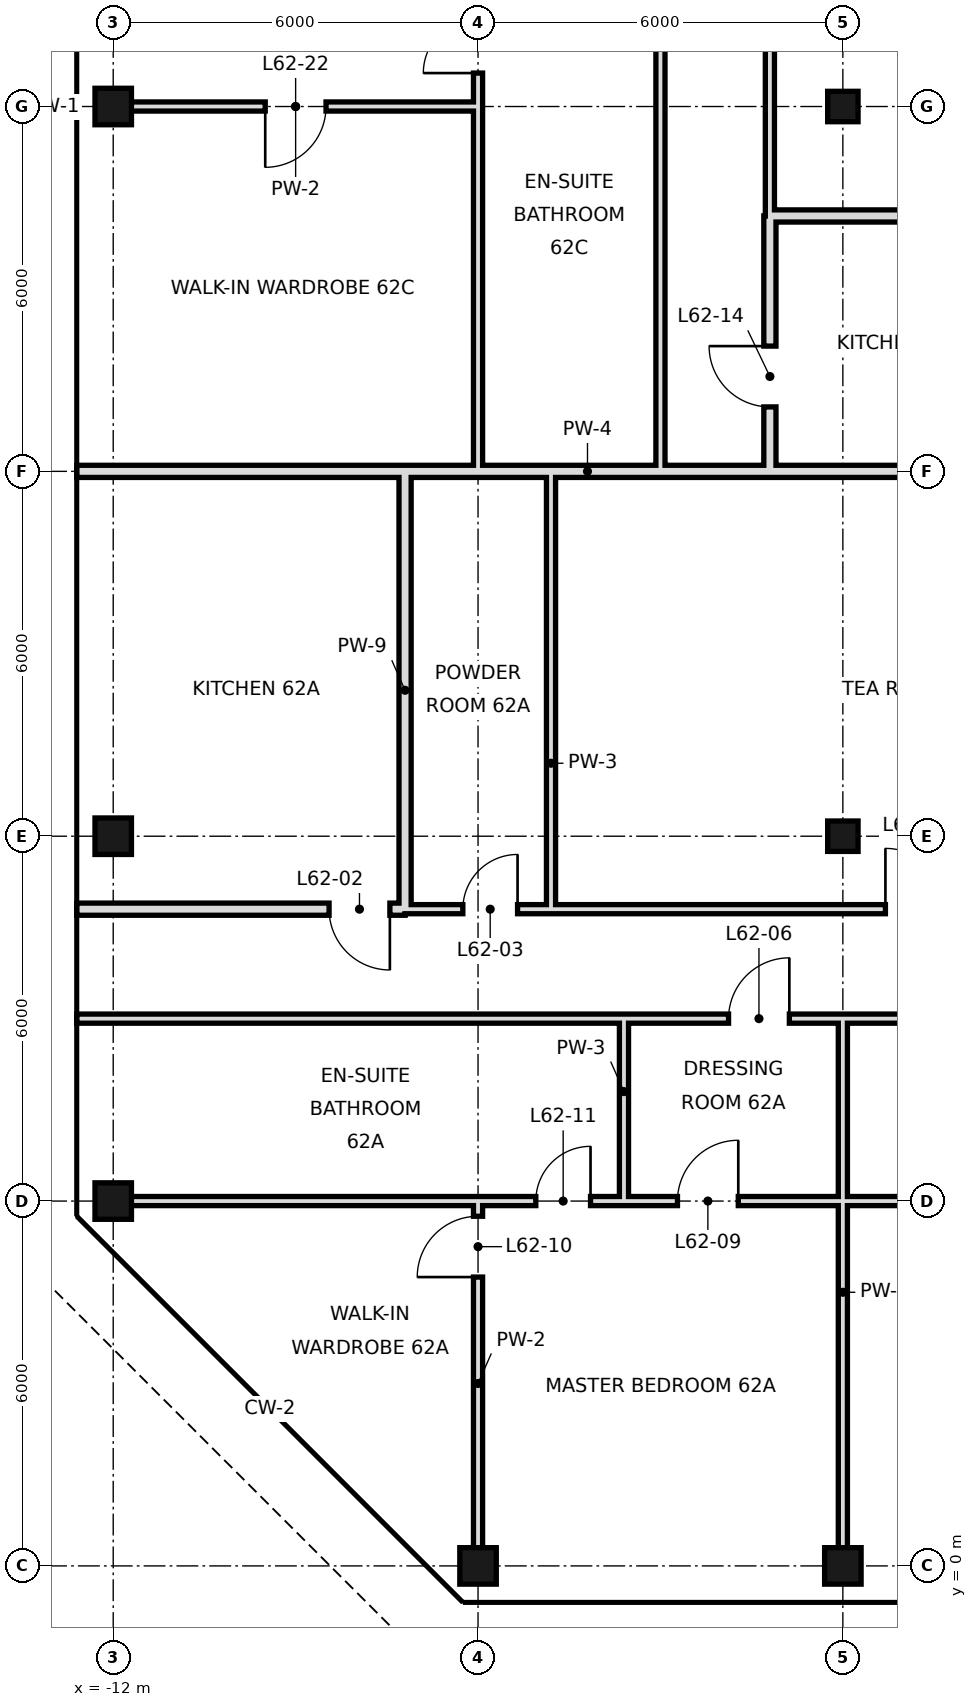
"""IFC4 building model, lengths in metres.
Left out: names, types, materials, properties, quantities, classifications, styles, units other than length and angle.
Written with IfcOpenShell. Run it as: python <this file> out.ifc"""

import sys

from ifc_helpers import new_model, si_unit, direction, frame, frame_2d, origin, origin_2d, place, context, subcontext, project, spatial, rectangle, hollow_rectangle, extrude, element, fill, save


model = new_model("IFC4")
c1 = context("Model", 3, precision=1e-05, world=origin(), true_north=direction((0.0, 1.0)))
c2 = subcontext(c1, "Body", "Model", "MODEL_VIEW")
j1 = project(units=[si_unit("LENGTHUNIT", "METRE"), si_unit("PLANEANGLEUNIT", "RADIAN")], contexts=[c1])
p1 = place(None, origin())
s1 = spatial("IfcSite", under=j1, at=p1, CompositionType="ELEMENT")
p2 = place(p1, origin())
s2 = spatial("IfcBuilding", under=s1, at=p2, CompositionType="ELEMENT")
p3 = place(p2, frame((0.0, 0.0, 263.0)))
s3 = spatial("IfcBuildingStorey", under=s2, at=p3, CompositionType="ELEMENT", Elevation=263.0)
for number, where, z_axis, x_axis in (
    (1, (-12.0, 6.0, 0.0), (0.0, 0.0, 1.0), (1.0, 0.0, 0.0)),
    (2, (-12.0, 12.0, 0.0), (0.0, 0.0, 1.0), (1.0, 0.0, 0.0)),
    (3, (-12.0, 24.0, 0.0), (0.0, 0.0, 1.0), (1.0, 0.0, 0.0)),
    (4, (-6.0, 0.0, 0.0), (0.0, 0.0, 1.0), (1.0, 0.0, 0.0)),
    (5, (0.0, 0.0, 0.0), (0.0, 0.0, 1.0), (1.0, 0.0, 0.0)),
):
    element("IfcColumn", number, at=place(p3, frame(where, z_axis=z_axis, x_axis=x_axis)), inside=s3, PredefinedType="COLUMN", context=c2, shape_type="SweptSolid", body=[
        extrude(hollow_rectangle(XDim=0.6, YDim=0.6, WallThickness=0.028, at=origin_2d()), origin(), (0.0, 0.0, 1.0), 3.6),
    ])
for number, where, z_axis, x_axis in (
    (6, (0.0, 12.0, 0.0), (0.0, 0.0, 1.0), (1.0, 0.0, 0.0)),
    (7, (0.0, 24.0, 0.0), (0.0, 0.0, 1.0), (1.0, 0.0, 0.0)),
):
    element("IfcColumn", number, at=place(p3, frame(where, z_axis=z_axis, x_axis=x_axis)), inside=s3, PredefinedType="COLUMN", context=c2, shape_type="SweptSolid", body=[
        extrude(hollow_rectangle(XDim=0.5, YDim=0.5, WallThickness=0.025, at=origin_2d()), origin(), (0.0, 0.0, 1.0), 3.6),
    ])
p4 = place(p3, frame((-1.2, 18.0, 0.0), z_axis=(0.0, 0.0, 1.0), x_axis=(0.0, 1.0, 0.0)))
e8 = element("IfcWall", 8, at=p4, inside=s3, PredefinedType="SOLIDWALL", context=c2, shape_type="SweptSolid", body=[
    extrude(rectangle(XDim=4.2, YDim=0.2, at=frame_2d((2.1, 0.0))), origin(), (0.0, 0.0, 1.0), 2.72),
])
p5 = place(p4, frame((1.06, 0.0, 0.0)))
e9 = element("IfcOpeningElement", 9, at=p5, cuts=e8, PredefinedType="OPENING", context=c2, shape_type="SweptSolid", body=[
    extrude(rectangle(XDim=1.0, YDim=2.4, at=frame_2d((0.5, 1.2))), frame((0.0, 0.11, 0.0), z_axis=(0.0, -1.0, 0.0), x_axis=(1.0, 0.0, 0.0)), (0.0, 0.0, 1.0), 0.22),
])
p6 = place(p3, frame((-1.2, 22.2, 0.0), z_axis=(0.0, 0.0, 1.0), x_axis=(0.0, 1.0, 0.0)))
e10 = element("IfcWall", 10, at=p6, inside=s3, PredefinedType="PARTITIONING", context=c2, shape_type="SweptSolid", body=[
    extrude(rectangle(XDim=23.4, YDim=0.15, at=frame_2d((11.7, 0.0))), origin(), (0.0, 0.0, 1.0), 3.42),
])
p7 = place(p6, frame((20.5, 0.0, 0.0)))
e11 = element("IfcOpeningElement", 11, at=p7, cuts=e10, PredefinedType="OPENING", context=c2, shape_type="SweptSolid", body=[
    extrude(rectangle(XDim=1.0, YDim=2.4, at=frame_2d((0.5, 1.2))), frame((0.0, 0.085, 0.0), z_axis=(0.0, -1.0, 0.0), x_axis=(1.0, 0.0, 0.0)), (0.0, 0.0, 1.0), 0.17),
])
p8 = place(p6, frame((3.82, 0.0, 0.0)))
e12 = element("IfcOpeningElement", 12, at=p8, cuts=e10, PredefinedType="OPENING", context=c2, shape_type="SweptSolid", body=[
    extrude(rectangle(XDim=1.0, YDim=2.4, at=frame_2d((0.5, 1.2))), frame((0.0, 0.085, 0.0), z_axis=(0.0, -1.0, 0.0), x_axis=(1.0, 0.0, 0.0)), (0.0, 0.0, 1.0), 0.17),
])
p9 = place(p6, frame((14.2, 0.0, 0.0)))
e13 = element("IfcOpeningElement", 13, at=p9, cuts=e10, PredefinedType="OPENING", context=c2, shape_type="SweptSolid", body=[
    extrude(rectangle(XDim=1.0, YDim=2.4, at=frame_2d((0.5, 1.2))), frame((0.0, 0.085, 0.0), z_axis=(0.0, -1.0, 0.0), x_axis=(1.0, 0.0, 0.0)), (0.0, 0.0, 1.0), 0.17),
])
p10 = place(p3, frame((-3.0, 18.0, 0.0), z_axis=(0.0, 0.0, 1.0), x_axis=(0.0, 1.0, 0.0)))
e14 = element("IfcWall", 14, at=p10, inside=s3, PredefinedType="PARTITIONING", context=c2, shape_type="SweptSolid", body=[
    extrude(rectangle(XDim=8.4, YDim=0.15, at=frame_2d((4.2, 0.0))), origin(), (0.0, 0.0, 1.0), 3.42),
])
p11 = place(p3, frame((-3.6, 6.0, 0.0), z_axis=(0.0, 0.0, 1.0), x_axis=(0.0, 1.0, 0.0)))
e15 = element("IfcWall", 15, at=p11, inside=s3, PredefinedType="PARTITIONING", context=c2, shape_type="SweptSolid", body=[
    extrude(rectangle(XDim=3.0, YDim=0.15, at=frame_2d((1.5, 0.0))), origin(), (0.0, 0.0, 1.0), 3.42),
])
p12 = place(p3, frame((-4.8, 10.8, 0.0), z_axis=(0.0, 0.0, 1.0), x_axis=(0.0, 1.0, 0.0)))
e16 = element("IfcWall", 16, at=p12, inside=s3, PredefinedType="PARTITIONING", context=c2, shape_type="SweptSolid", body=[
    extrude(rectangle(XDim=7.2, YDim=0.15, at=frame_2d((3.6, 0.0))), origin(), (0.0, 0.0, 1.0), 3.42),
])
p13 = place(p3, frame((-6.0, 0.0, 0.0), z_axis=(0.0, 0.0, 1.0), x_axis=(0.0, 1.0, 0.0)))
e17 = element("IfcWall", 17, at=p13, inside=s3, PredefinedType="PARTITIONING", context=c2, shape_type="SweptSolid", body=[
    extrude(rectangle(XDim=6.0, YDim=0.15, at=frame_2d((3.0, 0.0))), origin(), (0.0, 0.0, 1.0), 3.42),
])
p14 = place(p13, frame((4.75, 0.0, 0.0)))
e18 = element("IfcOpeningElement", 18, at=p14, cuts=e17, PredefinedType="OPENING", context=c2, shape_type="SweptSolid", body=[
    extrude(rectangle(XDim=1.0, YDim=2.4, at=frame_2d((0.5, 1.2))), frame((0.0, 0.085, 0.0), z_axis=(0.0, -1.0, 0.0), x_axis=(1.0, 0.0, 0.0)), (0.0, 0.0, 1.0), 0.17),
])
p15 = place(p3, frame((-6.0, 18.0, 0.0), z_axis=(0.0, 0.0, 1.0), x_axis=(0.0, 1.0, 0.0)))
e19 = element("IfcWall", 19, at=p15, inside=s3, PredefinedType="PARTITIONING", context=c2, shape_type="SweptSolid", body=[
    extrude(rectangle(XDim=8.4, YDim=0.15, at=frame_2d((4.2, 0.0))), origin(), (0.0, 0.0, 1.0), 3.42),
])
p16 = place(p15, frame((6.55, 0.0, 0.0)))
e20 = element("IfcOpeningElement", 20, at=p16, cuts=e19, PredefinedType="OPENING", context=c2, shape_type="SweptSolid", body=[
    extrude(rectangle(XDim=0.9, YDim=2.4, at=frame_2d((0.45, 1.2))), frame((0.0, 0.085, 0.0), z_axis=(0.0, -1.0, 0.0), x_axis=(1.0, 0.0, 0.0)), (0.0, 0.0, 1.0), 0.17),
])
p17 = place(p3, frame((-7.2, 10.8, 0.0), z_axis=(0.0, 0.0, 1.0), x_axis=(0.0, 1.0, 0.0)))
e21 = element("IfcWall", 21, at=p17, inside=s3, PredefinedType="SOLIDWALL", context=c2, shape_type="SweptSolid", body=[
    extrude(rectangle(XDim=7.2, YDim=0.2, at=frame_2d((3.6, 0.0))), origin(), (0.0, 0.0, 1.0), 2.72),
])
p18 = place(p3, frame((0.0, 0.0, 0.0), z_axis=(0.0, 0.0, 1.0), x_axis=(0.0, 1.0, 0.0)))
e22 = element("IfcWall", 22, at=p18, inside=s3, PredefinedType="PARTITIONING", context=c2, shape_type="SweptSolid", body=[
    extrude(rectangle(XDim=9.0, YDim=0.15, at=frame_2d((4.5, 0.0))), origin(), (0.0, 0.0, 1.0), 2.72),
])
p19 = place(p3, frame((-12.6, 10.8, 0.0), z_axis=(0.0, 0.0, 1.0), x_axis=(1.0, 0.0, 0.0)))
e23 = element("IfcWall", 23, at=p19, inside=s3, PredefinedType="SOLIDWALL", context=c2, shape_type="SweptSolid", body=[
    extrude(rectangle(XDim=5.4, YDim=0.2, at=frame_2d((2.7, 0.0))), origin(), (0.0, 0.0, 1.0), 2.97),
])
p20 = place(p19, frame((4.15, 0.0, 0.0)))
e24 = element("IfcOpeningElement", 24, at=p20, cuts=e23, PredefinedType="OPENING", context=c2, shape_type="SweptSolid", body=[
    extrude(rectangle(XDim=1.0, YDim=2.4, at=frame_2d((0.5, 1.2))), frame((0.0, 0.11, 0.0), z_axis=(0.0, -1.0, 0.0), x_axis=(1.0, 0.0, 0.0)), (0.0, 0.0, 1.0), 0.22),
])
p21 = place(p3, frame((-4.8, 10.8, 0.0), z_axis=(0.0, 0.0, 1.0), x_axis=(1.0, 0.0, 0.0)))
e25 = element("IfcWall", 25, at=p21, inside=s3, PredefinedType="PARTITIONING", context=c2, shape_type="SweptSolid", body=[
    extrude(rectangle(XDim=22.8, YDim=0.15, at=frame_2d((11.4, 0.0))), origin(), (0.0, 0.0, 1.0), 3.42),
])
p22 = place(p21, frame((15.4, 0.0, 0.0)))
e26 = element("IfcOpeningElement", 26, at=p22, cuts=e25, PredefinedType="OPENING", context=c2, shape_type="SweptSolid", body=[
    extrude(rectangle(XDim=1.0, YDim=2.4, at=frame_2d((0.5, 1.2))), frame((0.0, 0.085, 0.0), z_axis=(0.0, -1.0, 0.0), x_axis=(1.0, 0.0, 0.0)), (0.0, 0.0, 1.0), 0.17),
])
p23 = place(p21, frame((5.5, 0.0, 0.0)))
e27 = element("IfcOpeningElement", 27, at=p23, cuts=e25, PredefinedType="OPENING", context=c2, shape_type="SweptSolid", body=[
    extrude(rectangle(XDim=1.0, YDim=2.4, at=frame_2d((0.5, 1.2))), frame((0.0, 0.085, 0.0), z_axis=(0.0, -1.0, 0.0), x_axis=(1.0, 0.0, 0.0)), (0.0, 0.0, 1.0), 0.17),
])
p24 = place(p21, frame((20.56, 0.0, 0.0)))
e28 = element("IfcOpeningElement", 28, at=p24, cuts=e25, PredefinedType="OPENING", context=c2, shape_type="SweptSolid", body=[
    extrude(rectangle(XDim=1.0, YDim=2.4, at=frame_2d((0.5, 1.2))), frame((0.0, 0.085, 0.0), z_axis=(0.0, -1.0, 0.0), x_axis=(1.0, 0.0, 0.0)), (0.0, 0.0, 1.0), 0.17),
])
p25 = place(p3, frame((-7.2, 10.8, 0.0), z_axis=(0.0, 0.0, 1.0), x_axis=(1.0, 0.0, 0.0)))
e29 = element("IfcWall", 29, at=p25, inside=s3, PredefinedType="PARTITIONING", context=c2, shape_type="SweptSolid", body=[
    extrude(rectangle(XDim=2.4, YDim=0.15, at=frame_2d((1.2, 0.0))), origin(), (0.0, 0.0, 1.0), 3.42),
])
p26 = place(p25, frame((0.95, 0.0, 0.0)))
e30 = element("IfcOpeningElement", 30, at=p26, cuts=e29, PredefinedType="OPENING", context=c2, shape_type="SweptSolid", body=[
    extrude(rectangle(XDim=0.9, YDim=2.4, at=frame_2d((0.45, 1.2))), frame((0.0, 0.085, 0.0), z_axis=(0.0, -1.0, 0.0), x_axis=(1.0, 0.0, 0.0)), (0.0, 0.0, 1.0), 0.17),
])
p27 = place(p3, frame((-12.6, 18.0, 0.0), z_axis=(0.0, 0.0, 1.0), x_axis=(1.0, 0.0, 0.0)))
e31 = element("IfcWall", 31, at=p27, inside=s3, PredefinedType="SOLIDWALL", context=c2, shape_type="SweptSolid", body=[
    extrude(rectangle(XDim=5.4, YDim=0.2, at=frame_2d((2.7, 0.0))), origin(), (0.0, 0.0, 1.0), 2.72),
])
p28 = place(p3, frame((-1.2, 18.0, 0.0), z_axis=(0.0, 0.0, 1.0), x_axis=(1.0, 0.0, 0.0)))
e32 = element("IfcWall", 32, at=p28, inside=s3, PredefinedType="SOLIDWALL", context=c2, shape_type="SweptSolid", body=[
    extrude(rectangle(XDim=4.3, YDim=0.2, at=frame_2d((2.15, 0.0))), origin(), (0.0, 0.0, 1.0), 2.72),
])
p29 = place(p3, frame((-7.2, 18.0, 0.0), z_axis=(0.0, 0.0, 1.0), x_axis=(1.0, 0.0, 0.0)))
e33 = element("IfcWall", 33, at=p29, inside=s3, PredefinedType="SOLIDWALL", context=c2, shape_type="SweptSolid", body=[
    extrude(rectangle(XDim=6.0, YDim=0.2, at=frame_2d((3.0, 0.0))), origin(), (0.0, 0.0, 1.0), 2.72),
])
p30 = place(p3, frame((-1.2, 22.2, 0.0), z_axis=(0.0, 0.0, 1.0), x_axis=(1.0, 0.0, 0.0)))
e34 = element("IfcWall", 34, at=p30, inside=s3, PredefinedType="SOLIDWALL", context=c2, shape_type="SweptSolid", body=[
    extrude(rectangle(XDim=4.3, YDim=0.2, at=frame_2d((2.15, 0.0))), origin(), (0.0, 0.0, 1.0), 2.72),
])
p31 = place(p3, frame((-12.0, 24.0, 0.0), z_axis=(0.0, 0.0, 1.0), x_axis=(1.0, 0.0, 0.0)))
e35 = element("IfcWall", 35, at=p31, inside=s3, PredefinedType="PARTITIONING", context=c2, shape_type="SweptSolid", body=[
    extrude(rectangle(XDim=6.0, YDim=0.15, at=frame_2d((3.0, 0.0))), origin(), (0.0, 0.0, 1.0), 2.72),
])
p32 = place(p31, frame((2.5, 0.0, 0.0)))
e36 = element("IfcOpeningElement", 36, at=p32, cuts=e35, PredefinedType="OPENING", context=c2, shape_type="SweptSolid", body=[
    extrude(rectangle(XDim=1.0, YDim=2.4, at=frame_2d((0.5, 1.2))), frame((0.0, 0.085, 0.0), z_axis=(0.0, -1.0, 0.0), x_axis=(1.0, 0.0, 0.0)), (0.0, 0.0, 1.0), 0.17),
])
p33 = place(p3, frame((-3.6, 6.0, 0.0), z_axis=(0.0, 0.0, 1.0), x_axis=(1.0, 0.0, 0.0)))
e37 = element("IfcWall", 37, at=p33, inside=s3, PredefinedType="PARTITIONING", context=c2, shape_type="SweptSolid", body=[
    extrude(rectangle(XDim=15.6, YDim=0.15, at=frame_2d((7.8, 0.0))), origin(), (0.0, 0.0, 1.0), 2.72),
])
p34 = place(p33, frame((0.88, 0.0, 0.0)))
e38 = element("IfcOpeningElement", 38, at=p34, cuts=e37, PredefinedType="OPENING", context=c2, shape_type="SweptSolid", body=[
    extrude(rectangle(XDim=1.0, YDim=2.4, at=frame_2d((0.5, 1.2))), frame((0.0, 0.085, 0.0), z_axis=(0.0, -1.0, 0.0), x_axis=(1.0, 0.0, 0.0)), (0.0, 0.0, 1.0), 0.17),
])
p35 = place(p33, frame((10.64, 0.0, 0.0)))
e39 = element("IfcOpeningElement", 39, at=p35, cuts=e37, PredefinedType="OPENING", context=c2, shape_type="SweptSolid", body=[
    extrude(rectangle(XDim=1.8, YDim=2.4, at=frame_2d((0.9, 1.2))), frame((0.0, 0.085, 0.0), z_axis=(0.0, -1.0, 0.0), x_axis=(1.0, 0.0, 0.0)), (0.0, 0.0, 1.0), 0.17),
])
p36 = place(p3, frame((-12.0, 6.0, 0.0), z_axis=(0.0, 0.0, 1.0), x_axis=(1.0, 0.0, 0.0)))
e40 = element("IfcWall", 40, at=p36, inside=s3, PredefinedType="PARTITIONING", context=c2, shape_type="SweptSolid", body=[
    extrude(rectangle(XDim=8.4, YDim=0.15, at=frame_2d((4.2, 0.0))), origin(), (0.0, 0.0, 1.0), 2.72),
])
p37 = place(p36, frame((6.95, 0.0, 0.0)))
e41 = element("IfcOpeningElement", 41, at=p37, cuts=e40, PredefinedType="OPENING", context=c2, shape_type="SweptSolid", body=[
    extrude(rectangle(XDim=0.9, YDim=2.4, at=frame_2d((0.45, 1.2))), frame((0.0, 0.085, 0.0), z_axis=(0.0, -1.0, 0.0), x_axis=(1.0, 0.0, 0.0)), (0.0, 0.0, 1.0), 0.17),
])
p38 = place(p3, frame((-3.6, 9.0, 0.0), z_axis=(0.0, 0.0, 1.0), x_axis=(1.0, 0.0, 0.0)))
e42 = element("IfcWall", 42, at=p38, inside=s3, PredefinedType="PARTITIONING", context=c2, shape_type="SweptSolid", body=[
    extrude(rectangle(XDim=21.6, YDim=0.15, at=frame_2d((10.8, 0.0))), origin(), (0.0, 0.0, 1.0), 3.42),
])
p39 = place(p38, frame((1.72, 0.0, 0.0)))
e43 = element("IfcOpeningElement", 43, at=p39, cuts=e42, PredefinedType="OPENING", context=c2, shape_type="SweptSolid", body=[
    extrude(rectangle(XDim=1.0, YDim=2.4, at=frame_2d((0.5, 1.2))), frame((0.0, 0.085, 0.0), z_axis=(0.0, -1.0, 0.0), x_axis=(1.0, 0.0, 0.0)), (0.0, 0.0, 1.0), 0.17),
])
p40 = place(p38, frame((6.76, 0.0, 0.0)))
e44 = element("IfcOpeningElement", 44, at=p40, cuts=e42, PredefinedType="OPENING", context=c2, shape_type="SweptSolid", body=[
    extrude(rectangle(XDim=1.8, YDim=2.4, at=frame_2d((0.9, 1.2))), frame((0.0, 0.085, 0.0), z_axis=(0.0, -1.0, 0.0), x_axis=(1.0, 0.0, 0.0)), (0.0, 0.0, 1.0), 0.17),
])
p41 = place(p38, frame((18.44, 0.0, 0.0)))
e45 = element("IfcOpeningElement", 45, at=p41, cuts=e42, PredefinedType="OPENING", context=c2, shape_type="SweptSolid", body=[
    extrude(rectangle(XDim=1.8, YDim=2.4, at=frame_2d((0.9, 1.2))), frame((0.0, 0.085, 0.0), z_axis=(0.0, -1.0, 0.0), x_axis=(1.0, 0.0, 0.0)), (0.0, 0.0, 1.0), 0.17),
])
p42 = place(p3, frame((-12.6, 9.0, 0.0), z_axis=(0.0, 0.0, 1.0), x_axis=(1.0, 0.0, 0.0)))
e46 = element("IfcWall", 46, at=p42, inside=s3, PredefinedType="PARTITIONING", context=c2, shape_type="SweptSolid", body=[
    extrude(rectangle(XDim=9.0, YDim=0.15, at=frame_2d((4.5, 0.0))), origin(), (0.0, 0.0, 1.0), 3.42),
])
p43 = place(p20, origin())
e47 = element("IfcDoor", 47, at=p43, inside=s3, OperationType="SINGLE_SWING_RIGHT", PredefinedType="DOOR", context=c2, shape_type="SweptSolid", body=[
    extrude(rectangle(XDim=1.0, YDim=2.4, at=frame_2d((0.5, 1.2))), frame((0.0, 0.025, 0.0), z_axis=(0.0, -1.0, 0.0), x_axis=(1.0, 0.0, 0.0)), (0.0, 0.0, 1.0), 0.05),
])
fill(e24, e47)
p44 = place(p26, frame((0.9, 0.0, 0.0), z_axis=(0.0, 0.0, 1.0), x_axis=(-1.0, 0.0, 0.0)))
e48 = element("IfcDoor", 48, at=p44, inside=s3, OperationType="SINGLE_SWING_LEFT", PredefinedType="DOOR", context=c2, shape_type="SweptSolid", body=[
    extrude(rectangle(XDim=0.9, YDim=2.4, at=frame_2d((0.45, 1.2))), frame((0.0, 0.025, 0.0), z_axis=(0.0, -1.0, 0.0), x_axis=(1.0, 0.0, 0.0)), (0.0, 0.0, 1.0), 0.05),
])
fill(e30, e48)
p45 = place(p23, origin())
e49 = element("IfcDoor", 49, at=p45, inside=s3, OperationType="SINGLE_SWING_LEFT", PredefinedType="DOOR", context=c2, shape_type="SweptSolid", body=[
    extrude(rectangle(XDim=1.0, YDim=2.4, at=frame_2d((0.5, 1.2))), frame((0.0, 0.025, 0.0), z_axis=(0.0, -1.0, 0.0), x_axis=(1.0, 0.0, 0.0)), (0.0, 0.0, 1.0), 0.05),
])
fill(e27, e49)
p46 = place(p39, frame((1.0, 0.0, 0.0), z_axis=(0.0, 0.0, 1.0), x_axis=(-1.0, 0.0, 0.0)))
e50 = element("IfcDoor", 50, at=p46, inside=s3, OperationType="SINGLE_SWING_LEFT", PredefinedType="DOOR", context=c2, shape_type="SweptSolid", body=[
    extrude(rectangle(XDim=1.0, YDim=2.4, at=frame_2d((0.5, 1.2))), frame((0.0, 0.025, 0.0), z_axis=(0.0, -1.0, 0.0), x_axis=(1.0, 0.0, 0.0)), (0.0, 0.0, 1.0), 0.05),
])
fill(e43, e50)
p47 = place(p34, frame((1.0, 0.0, 0.0), z_axis=(0.0, 0.0, 1.0), x_axis=(-1.0, 0.0, 0.0)))
e51 = element("IfcDoor", 51, at=p47, inside=s3, OperationType="SINGLE_SWING_LEFT", PredefinedType="DOOR", context=c2, shape_type="SweptSolid", body=[
    extrude(rectangle(XDim=1.0, YDim=2.4, at=frame_2d((0.5, 1.2))), frame((0.0, 0.025, 0.0), z_axis=(0.0, -1.0, 0.0), x_axis=(1.0, 0.0, 0.0)), (0.0, 0.0, 1.0), 0.05),
])
fill(e38, e51)
p48 = place(p14, origin())
e52 = element("IfcDoor", 52, at=p48, inside=s3, OperationType="SINGLE_SWING_LEFT", PredefinedType="DOOR", context=c2, shape_type="SweptSolid", body=[
    extrude(rectangle(XDim=1.0, YDim=2.4, at=frame_2d((0.5, 1.2))), frame((0.0, 0.025, 0.0), z_axis=(0.0, -1.0, 0.0), x_axis=(1.0, 0.0, 0.0)), (0.0, 0.0, 1.0), 0.05),
])
fill(e18, e52)
p49 = place(p37, frame((0.9, 0.0, 0.0), z_axis=(0.0, 0.0, 1.0), x_axis=(-1.0, 0.0, 0.0)))
e53 = element("IfcDoor", 53, at=p49, inside=s3, OperationType="SINGLE_SWING_LEFT", PredefinedType="DOOR", context=c2, shape_type="SweptSolid", body=[
    extrude(rectangle(XDim=0.9, YDim=2.4, at=frame_2d((0.45, 1.2))), frame((0.0, 0.025, 0.0), z_axis=(0.0, -1.0, 0.0), x_axis=(1.0, 0.0, 0.0)), (0.0, 0.0, 1.0), 0.05),
])
fill(e41, e53)
p50 = place(p5, frame((1.0, 0.0, 0.0), z_axis=(0.0, 0.0, 1.0), x_axis=(-1.0, 0.0, 0.0)))
e54 = element("IfcDoor", 54, at=p50, inside=s3, OperationType="SINGLE_SWING_LEFT", PredefinedType="DOOR", context=c2, shape_type="SweptSolid", body=[
    extrude(rectangle(XDim=1.0, YDim=2.4, at=frame_2d((0.5, 1.2))), frame((0.0, 0.025, 0.0), z_axis=(0.0, -1.0, 0.0), x_axis=(1.0, 0.0, 0.0)), (0.0, 0.0, 1.0), 0.05),
])
fill(e9, e54)
p51 = place(p32, frame((1.0, 0.0, 0.0), z_axis=(0.0, 0.0, 1.0), x_axis=(-1.0, 0.0, 0.0)))
e55 = element("IfcDoor", 55, at=p51, inside=s3, OperationType="SINGLE_SWING_RIGHT", PredefinedType="DOOR", context=c2, shape_type="SweptSolid", body=[
    extrude(rectangle(XDim=1.0, YDim=2.4, at=frame_2d((0.5, 1.2))), frame((0.0, 0.025, 0.0), z_axis=(0.0, -1.0, 0.0), x_axis=(1.0, 0.0, 0.0)), (0.0, 0.0, 1.0), 0.05),
])
fill(e36, e55)
p52 = place(p16, origin())
e56 = element("IfcDoor", 56, at=p52, inside=s3, OperationType="SINGLE_SWING_LEFT", PredefinedType="DOOR", context=c2, shape_type="SweptSolid", body=[
    extrude(rectangle(XDim=0.9, YDim=2.4, at=frame_2d((0.45, 1.2))), frame((0.0, 0.025, 0.0), z_axis=(0.0, -1.0, 0.0), x_axis=(1.0, 0.0, 0.0)), (0.0, 0.0, 1.0), 0.05),
])
fill(e20, e56)
save(model, sys.argv[1])
